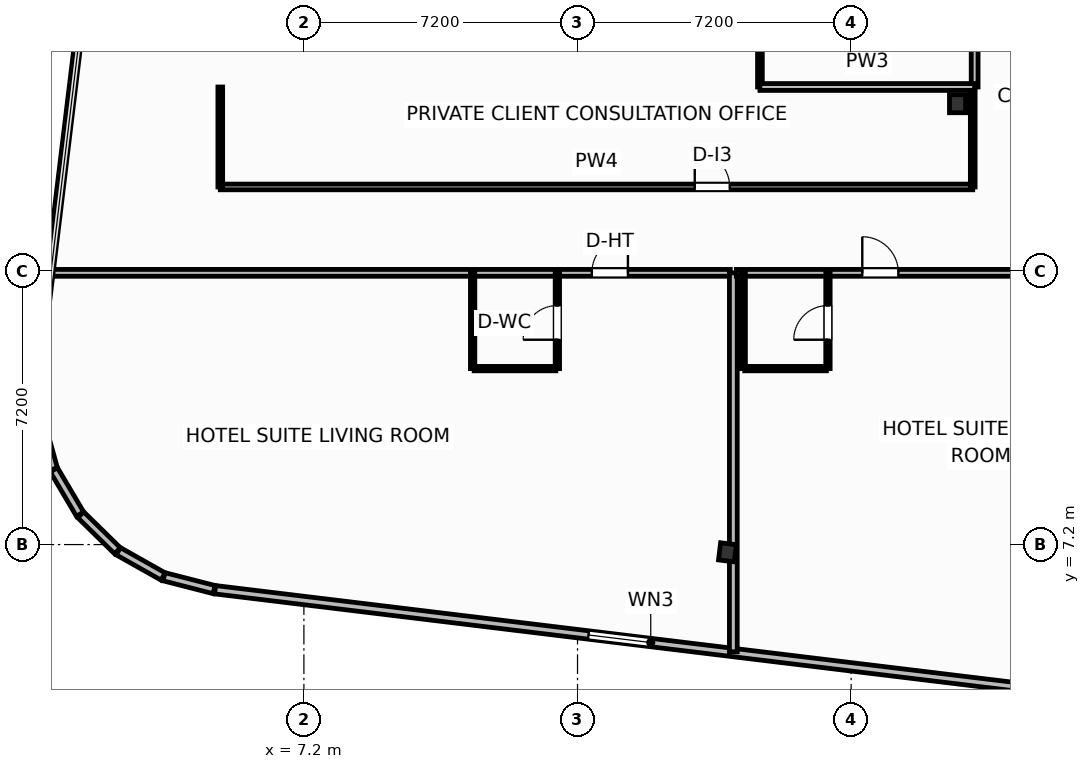
"""IFC4 building model, lengths in metres.
Left out: names, types, materials, properties, quantities, classifications, styles, units other than length and angle.
Written with IfcOpenShell. Run it as: python <this file> out.ifc"""

import sys

from ifc_helpers import new_model, si_unit, direction, frame, frame_2d, origin, origin_2d, place, context, subcontext, project, spatial, rectangle, i_section, extrude, element, fill, save


model = new_model("IFC4")
c1 = context("Model", 3, precision=1e-05, world=origin(), true_north=direction((0.0, 1.0)))
c2 = subcontext(c1, "Body", "Model", "MODEL_VIEW")
j1 = project(units=[si_unit("LENGTHUNIT", "METRE"), si_unit("PLANEANGLEUNIT", "RADIAN")], contexts=[c1])
p1 = place(None, origin())
s1 = spatial("IfcSite", under=j1, at=p1, CompositionType="ELEMENT")
p2 = place(p1, origin())
s2 = spatial("IfcBuilding", under=s1, at=p2, CompositionType="ELEMENT")
p3 = place(p2, frame((0.0, 0.0, 140.2)))
s3 = spatial("IfcBuildingStorey", under=s2, at=p3, CompositionType="ELEMENT", Elevation=140.2)
p4 = place(p3, frame((24.4, 18.8, 0.0), z_axis=(0.0, 0.0, 1.0), x_axis=(1.0, 0.0, 0.0)))
e1 = element("IfcColumn", 1, at=p4, inside=s3, PredefinedType="COLUMN", context=c2, shape_type="SweptSolid", body=[
    extrude(i_section(OverallWidth=0.424, OverallDepth=0.474, WebThickness=0.048, FlangeThickness=0.077, FilletRadius=0.025, at=origin_2d()), origin(), (0.0, 0.0, 1.0), 3.7),
])
p5 = place(p3, frame((18.346, 6.997, 0.0), z_axis=(0.0, 0.0, 1.0), x_axis=(0.992732158755, -0.12034475881, 0.0)))
e2 = element("IfcColumn", 2, at=p5, inside=s3, PredefinedType="COLUMN", context=c2, shape_type="SweptSolid", body=[
    extrude(i_section(OverallWidth=0.418, OverallDepth=0.455, WebThickness=0.042, FlangeThickness=0.068, FilletRadius=0.025, at=origin_2d()), origin(), (0.0, 0.0, 1.0), 3.7),
])
p6 = place(p3, frame((0.245, 10.491, 0.0), z_axis=(0.0, 0.0, 1.0), x_axis=(0.268853470153, -0.963181089716, 0.0)))
e3 = element("IfcWall", 3, at=p6, inside=s3, PredefinedType="SOLIDWALL", context=c2, shape_type="SweptSolid", body=[
    extrude(rectangle(XDim=1.353, YDim=0.22, at=frame_2d((0.677, 0.0))), origin(), (0.0, 0.0, 1.0), 2.73),
])
p7 = place(p3, frame((0.622, 9.166, 0.0), z_axis=(0.0, 0.0, 1.0), x_axis=(0.508911700393, -0.860818727261, 0.0)))
e4 = element("IfcWall", 4, at=p7, inside=s3, PredefinedType="SOLIDWALL", context=c2, shape_type="SweptSolid", body=[
    extrude(rectangle(XDim=1.353, YDim=0.22, at=frame_2d((0.676, 0.0))), origin(), (0.0, 0.0, 1.0), 2.73),
])
p8 = place(p3, frame((1.328, 7.984, 0.0), z_axis=(0.0, 0.0, 1.0), x_axis=(0.714376989847, -0.69976104234, 0.0)))
e5 = element("IfcWall", 5, at=p8, inside=s3, PredefinedType="SOLIDWALL", context=c2, shape_type="SweptSolid", body=[
    extrude(rectangle(XDim=1.353, YDim=0.22, at=frame_2d((0.677, 0.0))), origin(), (0.0, 0.0, 1.0), 2.73),
])
p9 = place(p3, frame((2.316, 7.025, 0.0), z_axis=(0.0, 0.0, 1.0), x_axis=(0.87113677592, -0.491040443996, 0.0)))
e6 = element("IfcWall", 6, at=p9, inside=s3, PredefinedType="SOLIDWALL", context=c2, shape_type="SweptSolid", body=[
    extrude(rectangle(XDim=1.353, YDim=0.22, at=frame_2d((0.677, 0.0))), origin(), (0.0, 0.0, 1.0), 2.73),
])
p10 = place(p3, frame((3.519, 6.354, 0.0), z_axis=(0.0, 0.0, 1.0), x_axis=(0.968506529347, -0.248988157573, 0.0)))
e7 = element("IfcWall", 7, at=p10, inside=s3, PredefinedType="SOLIDWALL", context=c2, shape_type="SweptSolid", body=[
    extrude(rectangle(XDim=1.361, YDim=0.22, at=frame_2d((0.681, 0.0))), origin(), (0.0, 0.0, 1.0), 2.73),
])
p11 = place(p3, frame((4.862, 6.012, 0.0), z_axis=(0.0, 0.0, 1.0), x_axis=(0.99273213367, -0.120344965739, 0.0)))
e8 = element("IfcWall", 8, at=p11, inside=s3, PredefinedType="SOLIDWALL", context=c2, shape_type="SweptSolid", body=[
    extrude(rectangle(XDim=21.447, YDim=0.22, at=frame_2d((10.724, 0.0))), origin(), (0.0, 0.0, 1.0), 2.73),
])
p12 = place(p11, frame((9.899, 0.0, 0.8)))
e9 = element("IfcOpeningElement", 9, at=p12, cuts=e8, PredefinedType="OPENING", context=c2, shape_type="SweptSolid", body=[
    extrude(rectangle(XDim=1.65, YDim=1.65, at=frame_2d((0.825, 0.825))), frame((0.0, 0.12, 0.0), z_axis=(0.0, -1.0, 0.0), x_axis=(1.0, 0.0, 0.0)), (0.0, 0.0, 1.0), 0.24),
])
p13 = place(p3, frame((5.0, 16.61, 0.0), z_axis=(0.0, 0.0, 1.0), x_axis=(1.0, 0.0, 0.0)))
e10 = element("IfcWall", 10, at=p13, inside=s3, PredefinedType="PARTITIONING", context=c2, shape_type="SweptSolid", body=[
    extrude(rectangle(XDim=19.8, YDim=0.15, at=frame_2d((9.9, 0.0))), origin(), (0.0, 0.0, 1.0), 3.45),
])
p14 = place(p13, frame((12.485, 0.0, 0.0)))
e11 = element("IfcOpeningElement", 11, at=p14, cuts=e10, PredefinedType="OPENING", context=c2, shape_type="SweptSolid", body=[
    extrude(rectangle(XDim=0.92, YDim=2.05, at=frame_2d((0.46, 1.025))), frame((0.0, 0.085, 0.0), z_axis=(0.0, -1.0, 0.0), x_axis=(1.0, 0.0, 0.0)), (0.0, 0.0, 1.0), 0.17),
])
p15 = place(p3, frame((5.0, 16.61, 0.0), z_axis=(0.0, 0.0, 1.0), x_axis=(0.0, 1.0, 0.0)))
e12 = element("IfcWall", 12, at=p15, inside=s3, PredefinedType="PARTITIONING", context=c2, shape_type="SweptSolid", body=[
    extrude(rectangle(XDim=2.63, YDim=0.125, at=frame_2d((1.315, 0.0))), origin(), (0.0, 0.0, 1.0), 3.45),
])
p16 = place(p3, frame((24.8, 16.61, 0.0), z_axis=(0.0, 0.0, 1.0), x_axis=(0.0, 1.0, 0.0)))
e13 = element("IfcWall", 13, at=p16, inside=s3, PredefinedType="PARTITIONING", context=c2, shape_type="SweptSolid", body=[
    extrude(rectangle(XDim=2.63, YDim=0.125, at=frame_2d((1.315, 0.0))), origin(), (0.0, 0.0, 1.0), 2.662),
])
p17 = place(p3, frame((0.581, 14.35, 0.0), z_axis=(0.0, 0.0, 1.0), x_axis=(1.0, 0.0, 0.0)))
e14 = element("IfcWall", 14, at=p17, inside=s3, PredefinedType="PARTITIONING", context=c2, shape_type="SweptSolid", body=[
    extrude(rectangle(XDim=17.839, YDim=0.18, at=frame_2d((8.919, 0.0))), origin(), (0.0, 0.0, 1.0), 3.45),
])
p18 = place(p17, frame((14.196, 0.0, 0.0)))
e15 = element("IfcOpeningElement", 15, at=p18, cuts=e14, PredefinedType="OPENING", context=c2, shape_type="SweptSolid", body=[
    extrude(rectangle(XDim=0.95, YDim=2.15, at=frame_2d((0.475, 1.075))), frame((0.0, 0.1, 0.0), z_axis=(0.0, -1.0, 0.0), x_axis=(1.0, 0.0, 0.0)), (0.0, 0.0, 1.0), 0.2),
])
p19 = place(p3, frame((11.68, 11.83, 0.0), z_axis=(0.0, 0.0, 1.0), x_axis=(1.0, 0.0, 0.0)))
e16 = element("IfcWall", 16, at=p19, inside=s3, PredefinedType="PARTITIONING", context=c2, shape_type="SweptSolid", body=[
    extrude(rectangle(XDim=2.15, YDim=0.115, at=frame_2d((1.075, 0.0))), origin(), (0.0, 0.0, 1.0), 3.45),
])
p20 = place(p3, frame((13.87, 11.83, 0.0), z_axis=(0.0, 0.0, 1.0), x_axis=(0.0, 1.0, 0.0)))
e17 = element("IfcWall", 17, at=p20, inside=s3, PredefinedType="PARTITIONING", context=c2, shape_type="SweptSolid", body=[
    extrude(rectangle(XDim=2.52, YDim=0.115, at=frame_2d((1.26, 0.0))), origin(), (0.0, 0.0, 1.0), 3.45),
])
p21 = place(p20, frame((0.76, 0.0, 0.0)))
e18 = element("IfcOpeningElement", 18, at=p21, cuts=e17, PredefinedType="OPENING", context=c2, shape_type="SweptSolid", body=[
    extrude(rectangle(XDim=0.9, YDim=2.05, at=frame_2d((0.45, 1.025))), frame((0.0, 0.067, 0.0), z_axis=(0.0, -1.0, 0.0), x_axis=(1.0, 0.0, 0.0)), (0.0, 0.0, 1.0), 0.135),
])
p22 = place(p3, frame((11.64, 11.83, 0.0), z_axis=(0.0, 0.0, 1.0), x_axis=(0.0, 1.0, 0.0)))
e19 = element("IfcWall", 19, at=p22, inside=s3, PredefinedType="PARTITIONING", context=c2, shape_type="SweptSolid", body=[
    extrude(rectangle(XDim=2.52, YDim=0.115, at=frame_2d((1.26, 0.0))), origin(), (0.0, 0.0, 1.0), 3.45),
])
p23 = place(p3, frame((18.5, 4.379, 0.0), z_axis=(0.0, 0.0, 1.0), x_axis=(0.0, 1.0, 0.0)))
e20 = element("IfcWall", 20, at=p23, inside=s3, PredefinedType="PARTITIONING", context=c2, shape_type="SweptSolid", body=[
    extrude(rectangle(XDim=9.971, YDim=0.205, at=frame_2d((4.985, 0.0))), origin(), (0.0, 0.0, 1.0), 3.45),
])
p24 = place(p3, frame((18.58, 14.35, 0.0), z_axis=(0.0, 0.0, 1.0), x_axis=(1.0, 0.0, 0.0)))
e21 = element("IfcWall", 21, at=p24, inside=s3, PredefinedType="PARTITIONING", context=c2, shape_type="SweptSolid", body=[
    extrude(rectangle(XDim=11.34, YDim=0.18, at=frame_2d((5.67, 0.0))), origin(), (0.0, 0.0, 1.0), 3.45),
])
p25 = place(p24, frame((3.313, 0.0, 0.0)))
e22 = element("IfcOpeningElement", 22, at=p25, cuts=e21, PredefinedType="OPENING", context=c2, shape_type="SweptSolid", body=[
    extrude(rectangle(XDim=0.95, YDim=2.15, at=frame_2d((0.475, 1.075))), frame((0.0, 0.1, 0.0), z_axis=(0.0, -1.0, 0.0), x_axis=(1.0, 0.0, 0.0)), (0.0, 0.0, 1.0), 0.2),
])
p26 = place(p3, frame((18.8, 11.83, 0.0), z_axis=(0.0, 0.0, 1.0), x_axis=(1.0, 0.0, 0.0)))
e23 = element("IfcWall", 23, at=p26, inside=s3, PredefinedType="PARTITIONING", context=c2, shape_type="SweptSolid", body=[
    extrude(rectangle(XDim=2.15, YDim=0.115, at=frame_2d((1.075, 0.0))), origin(), (0.0, 0.0, 1.0), 3.45),
])
p27 = place(p3, frame((20.99, 11.83, 0.0), z_axis=(0.0, 0.0, 1.0), x_axis=(0.0, 1.0, 0.0)))
e24 = element("IfcWall", 24, at=p27, inside=s3, PredefinedType="PARTITIONING", context=c2, shape_type="SweptSolid", body=[
    extrude(rectangle(XDim=2.52, YDim=0.115, at=frame_2d((1.26, 0.0))), origin(), (0.0, 0.0, 1.0), 3.45),
])
p28 = place(p27, frame((0.76, 0.0, 0.0)))
e25 = element("IfcOpeningElement", 25, at=p28, cuts=e24, PredefinedType="OPENING", context=c2, shape_type="SweptSolid", body=[
    extrude(rectangle(XDim=0.9, YDim=2.05, at=frame_2d((0.45, 1.025))), frame((0.0, 0.067, 0.0), z_axis=(0.0, -1.0, 0.0), x_axis=(1.0, 0.0, 0.0)), (0.0, 0.0, 1.0), 0.135),
])
p29 = place(p3, frame((18.76, 11.83, 0.0), z_axis=(0.0, 0.0, 1.0), x_axis=(0.0, 1.0, 0.0)))
e26 = element("IfcWall", 26, at=p29, inside=s3, PredefinedType="PARTITIONING", context=c2, shape_type="SweptSolid", body=[
    extrude(rectangle(XDim=2.52, YDim=0.115, at=frame_2d((1.26, 0.0))), origin(), (0.0, 0.0, 1.0), 3.45),
])
p30 = place(p3, frame((24.85, 19.24, 0.0), z_axis=(0.0, 0.0, 1.0), x_axis=(0.0, 1.0, 0.0)))
e27 = element("IfcWall", 27, at=p30, inside=s3, PredefinedType="PARTITIONING", context=c2, shape_type="SweptSolid", body=[
    extrude(rectangle(XDim=7.42, YDim=0.18, at=frame_2d((3.71, 0.0))), origin(), (0.0, 0.0, 1.0), 3.45),
])
p31 = place(p30, frame((2.4, 0.0, 0.0)))
e28 = element("IfcOpeningElement", 28, at=p31, cuts=e27, PredefinedType="OPENING", context=c2, shape_type="SweptSolid", body=[
    extrude(rectangle(XDim=0.92, YDim=2.05, at=frame_2d((0.46, 1.025))), frame((0.0, 0.1, 0.0), z_axis=(0.0, -1.0, 0.0), x_axis=(1.0, 0.0, 0.0)), (0.0, 0.0, 1.0), 0.2),
])
p32 = place(p3, frame((19.2, 19.24, 0.0), z_axis=(0.0, 0.0, 1.0), x_axis=(0.0, 1.0, 0.0)))
e29 = element("IfcWall", 29, at=p32, inside=s3, PredefinedType="PARTITIONING", context=c2, shape_type="SweptSolid", body=[
    extrude(rectangle(XDim=7.42, YDim=0.125, at=frame_2d((3.71, 0.0))), origin(), (0.0, 0.0, 1.0), 3.45),
])
p33 = place(p3, frame((19.2, 19.24, 0.0), z_axis=(0.0, 0.0, 1.0), x_axis=(1.0, 0.0, 0.0)))
e30 = element("IfcWall", 30, at=p33, inside=s3, PredefinedType="PARTITIONING", context=c2, shape_type="SweptSolid", body=[
    extrude(rectangle(XDim=5.65, YDim=0.18, at=frame_2d((2.825, 0.0))), origin(), (0.0, 0.0, 1.0), 3.45),
])
p34 = place(p12, origin())
e31 = element("IfcWindow", 31, at=p34, inside=s3, PartitioningType="SINGLE_PANEL", PredefinedType="WINDOW", context=c2, shape_type="SweptSolid", body=[
    extrude(rectangle(XDim=1.65, YDim=1.65, at=frame_2d((0.825, 0.825))), frame((0.0, 0.03, 0.0), z_axis=(0.0, -1.0, 0.0), x_axis=(1.0, 0.0, 0.0)), (0.0, 0.0, 1.0), 0.06),
])
fill(e9, e31)
p35 = place(p14, origin())
e32 = element("IfcDoor", 32, at=p35, inside=s3, OperationType="SINGLE_SWING_LEFT", PredefinedType="DOOR", context=c2, shape_type="SweptSolid", body=[
    extrude(rectangle(XDim=0.92, YDim=2.05, at=frame_2d((0.46, 1.025))), frame((0.0, 0.025, 0.0), z_axis=(0.0, -1.0, 0.0), x_axis=(1.0, 0.0, 0.0)), (0.0, 0.0, 1.0), 0.05),
])
fill(e11, e32)
p36 = place(p18, origin())
e33 = element("IfcDoor", 33, at=p36, inside=s3, OperationType="SINGLE_SWING_RIGHT", PredefinedType="DOOR", context=c2, shape_type="SweptSolid", body=[
    extrude(rectangle(XDim=0.95, YDim=2.15, at=frame_2d((0.475, 1.075))), frame((0.0, 0.025, 0.0), z_axis=(0.0, -1.0, 0.0), x_axis=(1.0, 0.0, 0.0)), (0.0, 0.0, 1.0), 0.05),
])
fill(e15, e33)
p37 = place(p21, origin())
e34 = element("IfcDoor", 34, at=p37, inside=s3, OperationType="SINGLE_SWING_LEFT", PredefinedType="DOOR", context=c2, shape_type="SweptSolid", body=[
    extrude(rectangle(XDim=0.9, YDim=2.05, at=frame_2d((0.45, 1.025))), frame((0.0, 0.025, 0.0), z_axis=(0.0, -1.0, 0.0), x_axis=(1.0, 0.0, 0.0)), (0.0, 0.0, 1.0), 0.05),
])
fill(e18, e34)
p38 = place(p25, origin())
e35 = element("IfcDoor", 35, at=p38, inside=s3, OperationType="SINGLE_SWING_LEFT", PredefinedType="DOOR", context=c2, shape_type="SweptSolid", body=[
    extrude(rectangle(XDim=0.95, YDim=2.15, at=frame_2d((0.475, 1.075))), frame((0.0, 0.025, 0.0), z_axis=(0.0, -1.0, 0.0), x_axis=(1.0, 0.0, 0.0)), (0.0, 0.0, 1.0), 0.05),
])
fill(e22, e35)
p39 = place(p28, origin())
e36 = element("IfcDoor", 36, at=p39, inside=s3, OperationType="SINGLE_SWING_LEFT", PredefinedType="DOOR", context=c2, shape_type="SweptSolid", body=[
    extrude(rectangle(XDim=0.9, YDim=2.05, at=frame_2d((0.45, 1.025))), frame((0.0, 0.025, 0.0), z_axis=(0.0, -1.0, 0.0), x_axis=(1.0, 0.0, 0.0)), (0.0, 0.0, 1.0), 0.05),
])
fill(e25, e36)
save(model, sys.argv[1])
